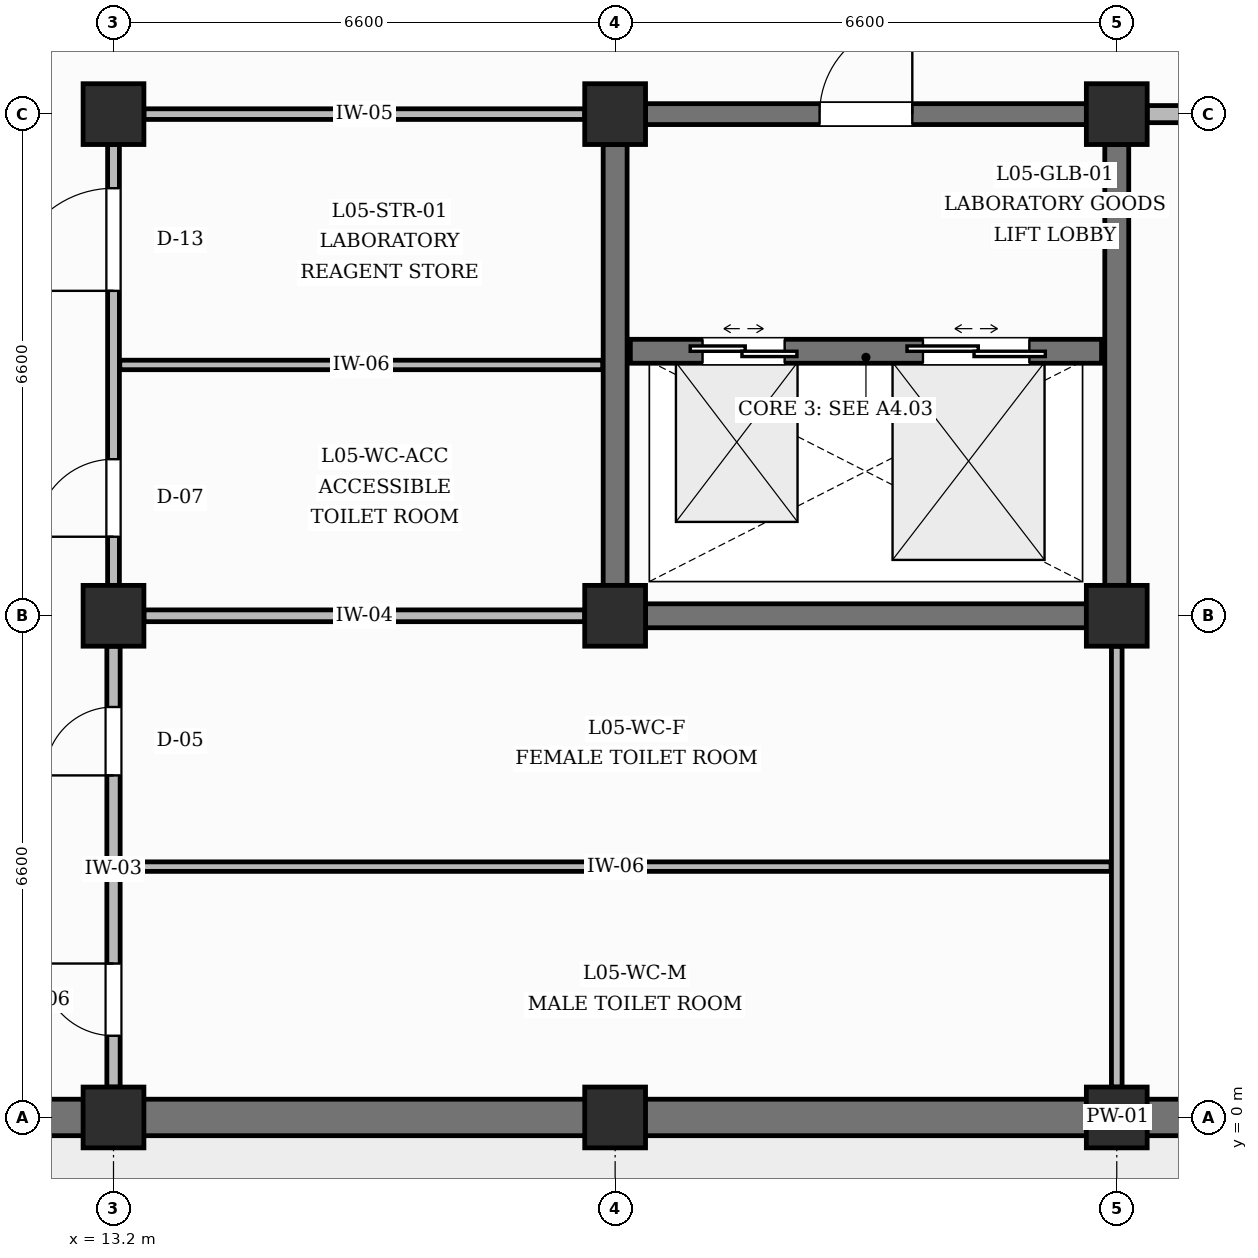
"""IFC4 building model, lengths in metres.
Left out: names, types, materials, properties, quantities, classifications, styles, units other than length and angle.
Written with IfcOpenShell. Run it as: python <this file> out.ifc"""

import sys

from ifc_helpers import new_model, si_unit, direction, frame, frame_2d, origin, origin_2d, place, context, subcontext, project, spatial, rectangle, extrude, element, fill, save


model = new_model("IFC4")
c1 = context("Model", 3, precision=1e-05, world=origin(), true_north=direction((0.0, 1.0)))
c2 = subcontext(c1, "Body", "Model", "MODEL_VIEW")
j1 = project(units=[si_unit("LENGTHUNIT", "METRE"), si_unit("PLANEANGLEUNIT", "RADIAN")], contexts=[c1])
p1 = place(None, origin())
s1 = spatial("IfcSite", under=j1, at=p1, CompositionType="ELEMENT")
p2 = place(p1, origin())
s2 = spatial("IfcBuilding", under=s1, at=p2, CompositionType="ELEMENT")
p3 = place(p2, frame((0.0, 0.0, 22.8)))
s3 = spatial("IfcBuildingStorey", under=s2, at=p3, CompositionType="ELEMENT", Elevation=22.8)
for number, where, z_axis, x_axis in (
    (1, (13.2, 0.0, 0.0), (0.0, 0.0, 1.0), (1.0, 0.0, 0.0)),
    (2, (13.2, 6.6, 0.0), (0.0, 0.0, 1.0), (1.0, 0.0, 0.0)),
    (3, (13.2, 13.2, 0.0), (0.0, 0.0, 1.0), (1.0, 0.0, 0.0)),
    (4, (19.8, 0.0, 0.0), (0.0, 0.0, 1.0), (1.0, 0.0, 0.0)),
    (5, (19.8, 6.6, 0.0), (0.0, 0.0, 1.0), (1.0, 0.0, 0.0)),
    (6, (19.8, 13.2, 0.0), (0.0, 0.0, 1.0), (1.0, 0.0, 0.0)),
    (7, (26.4, 0.0, 0.0), (0.0, 0.0, 1.0), (1.0, 0.0, 0.0)),
    (8, (26.4, 6.6, 0.0), (0.0, 0.0, 1.0), (1.0, 0.0, 0.0)),
    (9, (26.4, 13.2, 0.0), (0.0, 0.0, 1.0), (1.0, 0.0, 0.0)),
):
    element("IfcColumn", number, at=place(p3, frame(where, z_axis=z_axis, x_axis=x_axis)), inside=s3, PredefinedType="COLUMN", context=c2, shape_type="SweptSolid", body=[
        extrude(rectangle(XDim=0.8, YDim=0.8, at=origin_2d()), origin(), (0.0, 0.0, 1.0), 4.2),
    ])
p4 = place(p3, frame((7.0, 0.0, 0.0), z_axis=(0.0, 0.0, 1.0), x_axis=(1.0, 0.0, 0.0)))
e10 = element("IfcWall", 10, at=p4, inside=s3, PredefinedType="SOLIDWALL", context=c2, shape_type="SweptSolid", body=[
    extrude(rectangle(XDim=5.8, YDim=0.48, at=frame_2d((2.9, 0.0))), origin(), (0.0, 0.0, 1.0), 3.27),
])
p5 = place(p3, frame((13.6, 0.0, 0.0), z_axis=(0.0, 0.0, 1.0), x_axis=(1.0, 0.0, 0.0)))
e11 = element("IfcWall", 11, at=p5, inside=s3, PredefinedType="SOLIDWALL", context=c2, shape_type="SweptSolid", body=[
    extrude(rectangle(XDim=5.8, YDim=0.48, at=frame_2d((2.9, 0.0))), origin(), (0.0, 0.0, 1.0), 3.27),
])
for number, where, z_axis, x_axis in (
    (12, (20.2, 0.0, 0.0), (0.0, 0.0, 1.0), (1.0, 0.0, 0.0)),
    (13, (26.8, 0.0, 0.0), (0.0, 0.0, 1.0), (1.0, 0.0, 0.0)),
):
    element("IfcWall", number, at=place(p3, frame(where, z_axis=z_axis, x_axis=x_axis)), inside=s3, PredefinedType="SOLIDWALL", context=c2, shape_type="SweptSolid", body=[
        extrude(rectangle(XDim=5.8, YDim=0.48, at=frame_2d((2.9, 0.0))), origin(), (0.0, 0.0, 1.0), 3.27),
    ])
for number, where, z_axis, x_axis in (
    (14, (20.2, 6.6, 0.0), (0.0, 0.0, 1.0), (1.0, 0.0, 0.0)),
    (15, (19.8, 7.0, 0.0), (0.0, 0.0, 1.0), (0.0, 1.0, 0.0)),
    (16, (26.4, 7.0, 0.0), (0.0, 0.0, 1.0), (0.0, 1.0, 0.0)),
):
    element("IfcWall", number, at=place(p3, frame(where, z_axis=z_axis, x_axis=x_axis)), inside=s3, PredefinedType="SHEAR", context=c2, shape_type="SweptSolid", body=[
        extrude(rectangle(XDim=5.8, YDim=0.315, at=frame_2d((2.9, 0.0))), origin(), (0.0, 0.0, 1.0), 3.17),
    ])
p6 = place(p3, frame((20.2, 13.2, 0.0), z_axis=(0.0, 0.0, 1.0), x_axis=(1.0, 0.0, 0.0)))
e17 = element("IfcWall", 17, at=p6, inside=s3, PredefinedType="SHEAR", context=c2, shape_type="SweptSolid", body=[
    extrude(rectangle(XDim=5.8, YDim=0.275, at=frame_2d((2.9, 0.0))), origin(), (0.0, 0.0, 1.0), 3.17),
])
p7 = place(p6, frame((2.29, 0.0, 0.0)))
e18 = element("IfcOpeningElement", 18, at=p7, cuts=e17, PredefinedType="OPENING", context=c2, shape_type="SweptSolid", body=[
    extrude(rectangle(XDim=1.22, YDim=2.15, at=frame_2d((0.61, 1.075))), frame((0.0, 0.147, 0.0), z_axis=(0.0, -1.0, 0.0), x_axis=(1.0, 0.0, 0.0)), (0.0, 0.0, 1.0), 0.295),
])
p8 = place(p3, frame((20.0, 10.08, 0.0), z_axis=(0.0, 0.0, 1.0), x_axis=(1.0, 0.0, 0.0)))
e19 = element("IfcWall", 19, at=p8, inside=s3, PredefinedType="SHEAR", context=c2, shape_type="SweptSolid", body=[
    extrude(rectangle(XDim=6.2, YDim=0.315, at=frame_2d((3.1, 0.0))), origin(), (0.0, 0.0, 1.0), 3.87),
])
p9 = place(p8, frame((0.95, 0.0, 0.0)))
e20 = element("IfcOpeningElement", 20, at=p9, cuts=e19, PredefinedType="OPENING", context=c2, shape_type="SweptSolid", body=[
    extrude(rectangle(XDim=1.08, YDim=2.15, at=frame_2d((0.54, 1.075))), frame((0.0, 0.167, 0.0), z_axis=(0.0, -1.0, 0.0), x_axis=(1.0, 0.0, 0.0)), (0.0, 0.0, 1.0), 0.335),
])
p10 = place(p8, frame((3.85, 0.0, 0.0)))
e21 = element("IfcOpeningElement", 21, at=p10, cuts=e19, PredefinedType="OPENING", context=c2, shape_type="SweptSolid", body=[
    extrude(rectangle(XDim=1.4, YDim=2.35, at=frame_2d((0.7, 1.175))), frame((0.0, 0.167, 0.0), z_axis=(0.0, -1.0, 0.0), x_axis=(1.0, 0.0, 0.0)), (0.0, 0.0, 1.0), 0.335),
])
p11 = place(p3, frame((13.2, 0.4, 0.0), z_axis=(0.0, 0.0, 1.0), x_axis=(0.0, 1.0, 0.0)))
e22 = element("IfcWall", 22, at=p11, inside=s3, PredefinedType="PARTITIONING", context=c2, shape_type="SweptSolid", body=[
    extrude(rectangle(XDim=5.8, YDim=0.175, at=frame_2d((2.9, 0.0))), origin(), (0.0, 0.0, 1.0), 3.17),
])
p12 = place(p11, frame((0.675, 0.0, 0.0)))
e23 = element("IfcOpeningElement", 23, at=p12, cuts=e22, PredefinedType="OPENING", context=c2, shape_type="SweptSolid", body=[
    extrude(rectangle(XDim=0.95, YDim=2.1, at=frame_2d((0.475, 1.05))), frame((0.0, 0.097, 0.0), z_axis=(0.0, -1.0, 0.0), x_axis=(1.0, 0.0, 0.0)), (0.0, 0.0, 1.0), 0.195),
])
p13 = place(p11, frame((4.1, 0.0, 0.0)))
e24 = element("IfcOpeningElement", 24, at=p13, cuts=e22, PredefinedType="OPENING", context=c2, shape_type="SweptSolid", body=[
    extrude(rectangle(XDim=0.9, YDim=2.1, at=frame_2d((0.45, 1.05))), frame((0.0, 0.097, 0.0), z_axis=(0.0, -1.0, 0.0), x_axis=(1.0, 0.0, 0.0)), (0.0, 0.0, 1.0), 0.195),
])
p14 = place(p3, frame((26.4, 0.4, 0.0), z_axis=(0.0, 0.0, 1.0), x_axis=(0.0, 1.0, 0.0)))
e25 = element("IfcWall", 25, at=p14, inside=s3, PredefinedType="PARTITIONING", context=c2, shape_type="SweptSolid", body=[
    extrude(rectangle(XDim=5.8, YDim=0.14, at=frame_2d((2.9, 0.0))), origin(), (0.0, 0.0, 1.0), 3.17),
])
p15 = place(p3, frame((13.6, 6.6, 0.0), z_axis=(0.0, 0.0, 1.0), x_axis=(1.0, 0.0, 0.0)))
e26 = element("IfcWall", 26, at=p15, inside=s3, PredefinedType="PARTITIONING", context=c2, shape_type="SweptSolid", body=[
    extrude(rectangle(XDim=5.8, YDim=0.155, at=frame_2d((2.9, 0.0))), origin(), (0.0, 0.0, 1.0), 3.17),
])
p16 = place(p3, frame((13.2, 7.0, 0.0), z_axis=(0.0, 0.0, 1.0), x_axis=(0.0, 1.0, 0.0)))
e27 = element("IfcWall", 27, at=p16, inside=s3, PredefinedType="PARTITIONING", context=c2, shape_type="SweptSolid", body=[
    extrude(rectangle(XDim=5.8, YDim=0.155, at=frame_2d((2.9, 0.0))), origin(), (0.0, 0.0, 1.0), 3.17),
])
p17 = place(p16, frame((0.64, 0.0, 0.0)))
e28 = element("IfcOpeningElement", 28, at=p17, cuts=e27, PredefinedType="OPENING", context=c2, shape_type="SweptSolid", body=[
    extrude(rectangle(XDim=1.02, YDim=2.15, at=frame_2d((0.51, 1.075))), frame((0.0, 0.087, 0.0), z_axis=(0.0, -1.0, 0.0), x_axis=(1.0, 0.0, 0.0)), (0.0, 0.0, 1.0), 0.175),
])
p18 = place(p16, frame((3.875, 0.0, 0.0)))
e29 = element("IfcOpeningElement", 29, at=p18, cuts=e27, PredefinedType="OPENING", context=c2, shape_type="SweptSolid", body=[
    extrude(rectangle(XDim=1.35, YDim=2.3, at=frame_2d((0.675, 1.15))), frame((0.0, 0.087, 0.0), z_axis=(0.0, -1.0, 0.0), x_axis=(1.0, 0.0, 0.0)), (0.0, 0.0, 1.0), 0.175),
])
p19 = place(p3, frame((13.6, 13.2, 0.0), z_axis=(0.0, 0.0, 1.0), x_axis=(1.0, 0.0, 0.0)))
e30 = element("IfcWall", 30, at=p19, inside=s3, PredefinedType="PARTITIONING", context=c2, shape_type="SweptSolid", body=[
    extrude(rectangle(XDim=5.8, YDim=0.14, at=frame_2d((2.9, 0.0))), origin(), (0.0, 0.0, 1.0), 3.17),
])
p20 = place(p3, frame((26.8, 13.2, 0.0), z_axis=(0.0, 0.0, 1.0), x_axis=(1.0, 0.0, 0.0)))
e31 = element("IfcWall", 31, at=p20, inside=s3, PredefinedType="PARTITIONING", context=c2, shape_type="SweptSolid", body=[
    extrude(rectangle(XDim=5.8, YDim=0.225, at=frame_2d((2.9, 0.0))), origin(), (0.0, 0.0, 1.0), 3.17),
])
p21 = place(p20, frame((2.2, 0.0, 0.0)))
e32 = element("IfcOpeningElement", 32, at=p21, cuts=e31, PredefinedType="OPENING", context=c2, shape_type="SweptSolid", body=[
    extrude(rectangle(XDim=1.4, YDim=2.25, at=frame_2d((0.7, 1.125))), frame((0.0, 0.123, 0.0), z_axis=(0.0, -1.0, 0.0), x_axis=(1.0, 0.0, 0.0)), (0.0, 0.0, 1.0), 0.245),
])
p22 = place(p3, frame((13.292, 3.3, 0.0), z_axis=(0.0, 0.0, 1.0), x_axis=(1.0, 0.0, 0.0)))
e33 = element("IfcWall", 33, at=p22, inside=s3, PredefinedType="PARTITIONING", context=c2, shape_type="SweptSolid", body=[
    extrude(rectangle(XDim=13.032, YDim=0.125, at=frame_2d((6.516, 0.0))), origin(), (0.0, 0.0, 1.0), 3.87),
])
p23 = place(p3, frame((13.282, 9.9, 0.0), z_axis=(0.0, 0.0, 1.0), x_axis=(1.0, 0.0, 0.0)))
e34 = element("IfcWall", 34, at=p23, inside=s3, PredefinedType="PARTITIONING", context=c2, shape_type="SweptSolid", body=[
    extrude(rectangle(XDim=6.355, YDim=0.125, at=frame_2d((3.177, 0.0))), origin(), (0.0, 0.0, 1.0), 3.87),
])
p24 = place(p9, origin())
e35 = element("IfcDoor", 35, at=p24, inside=s3, OperationType="DOUBLE_DOOR_SLIDING", PredefinedType="USERDEFINED", context=c2, shape_type="SweptSolid", body=[
    extrude(rectangle(XDim=1.08, YDim=2.15, at=frame_2d((0.54, 1.075))), frame((0.0, 0.025, 0.0), z_axis=(0.0, -1.0, 0.0), x_axis=(1.0, 0.0, 0.0)), (0.0, 0.0, 1.0), 0.05),
])
fill(e20, e35)
p25 = place(p10, origin())
e36 = element("IfcDoor", 36, at=p25, inside=s3, OperationType="DOUBLE_DOOR_SLIDING", PredefinedType="USERDEFINED", context=c2, shape_type="SweptSolid", body=[
    extrude(rectangle(XDim=1.4, YDim=2.35, at=frame_2d((0.7, 1.175))), frame((0.0, 0.025, 0.0), z_axis=(0.0, -1.0, 0.0), x_axis=(1.0, 0.0, 0.0)), (0.0, 0.0, 1.0), 0.05),
])
fill(e21, e36)
p26 = place(p7, origin())
e37 = element("IfcDoor", 37, at=p26, inside=s3, OperationType="SINGLE_SWING_RIGHT", PredefinedType="DOOR", context=c2, shape_type="SweptSolid", body=[
    extrude(rectangle(XDim=1.22, YDim=2.15, at=frame_2d((0.61, 1.075))), frame((0.0, 0.025, 0.0), z_axis=(0.0, -1.0, 0.0), x_axis=(1.0, 0.0, 0.0)), (0.0, 0.0, 1.0), 0.05),
])
fill(e18, e37)
p27 = place(p12, origin())
e38 = element("IfcDoor", 38, at=p27, inside=s3, OperationType="SINGLE_SWING_RIGHT", PredefinedType="DOOR", context=c2, shape_type="SweptSolid", body=[
    extrude(rectangle(XDim=0.95, YDim=2.1, at=frame_2d((0.475, 1.05))), frame((0.0, 0.025, 0.0), z_axis=(0.0, -1.0, 0.0), x_axis=(1.0, 0.0, 0.0)), (0.0, 0.0, 1.0), 0.05),
])
fill(e23, e38)
p28 = place(p13, origin())
e39 = element("IfcDoor", 39, at=p28, inside=s3, OperationType="SINGLE_SWING_LEFT", PredefinedType="DOOR", context=c2, shape_type="SweptSolid", body=[
    extrude(rectangle(XDim=0.9, YDim=2.1, at=frame_2d((0.45, 1.05))), frame((0.0, 0.025, 0.0), z_axis=(0.0, -1.0, 0.0), x_axis=(1.0, 0.0, 0.0)), (0.0, 0.0, 1.0), 0.05),
])
fill(e24, e39)
p29 = place(p17, origin())
e40 = element("IfcDoor", 40, at=p29, inside=s3, OperationType="SINGLE_SWING_LEFT", PredefinedType="DOOR", context=c2, shape_type="SweptSolid", body=[
    extrude(rectangle(XDim=1.02, YDim=2.15, at=frame_2d((0.51, 1.075))), frame((0.0, 0.025, 0.0), z_axis=(0.0, -1.0, 0.0), x_axis=(1.0, 0.0, 0.0)), (0.0, 0.0, 1.0), 0.05),
])
fill(e28, e40)
p30 = place(p18, origin())
e41 = element("IfcDoor", 41, at=p30, inside=s3, OperationType="SINGLE_SWING_LEFT", PredefinedType="DOOR", context=c2, shape_type="SweptSolid", body=[
    extrude(rectangle(XDim=1.35, YDim=2.3, at=frame_2d((0.675, 1.15))), frame((0.0, 0.025, 0.0), z_axis=(0.0, -1.0, 0.0), x_axis=(1.0, 0.0, 0.0)), (0.0, 0.0, 1.0), 0.05),
])
fill(e29, e41)
save(model, sys.argv[1])
